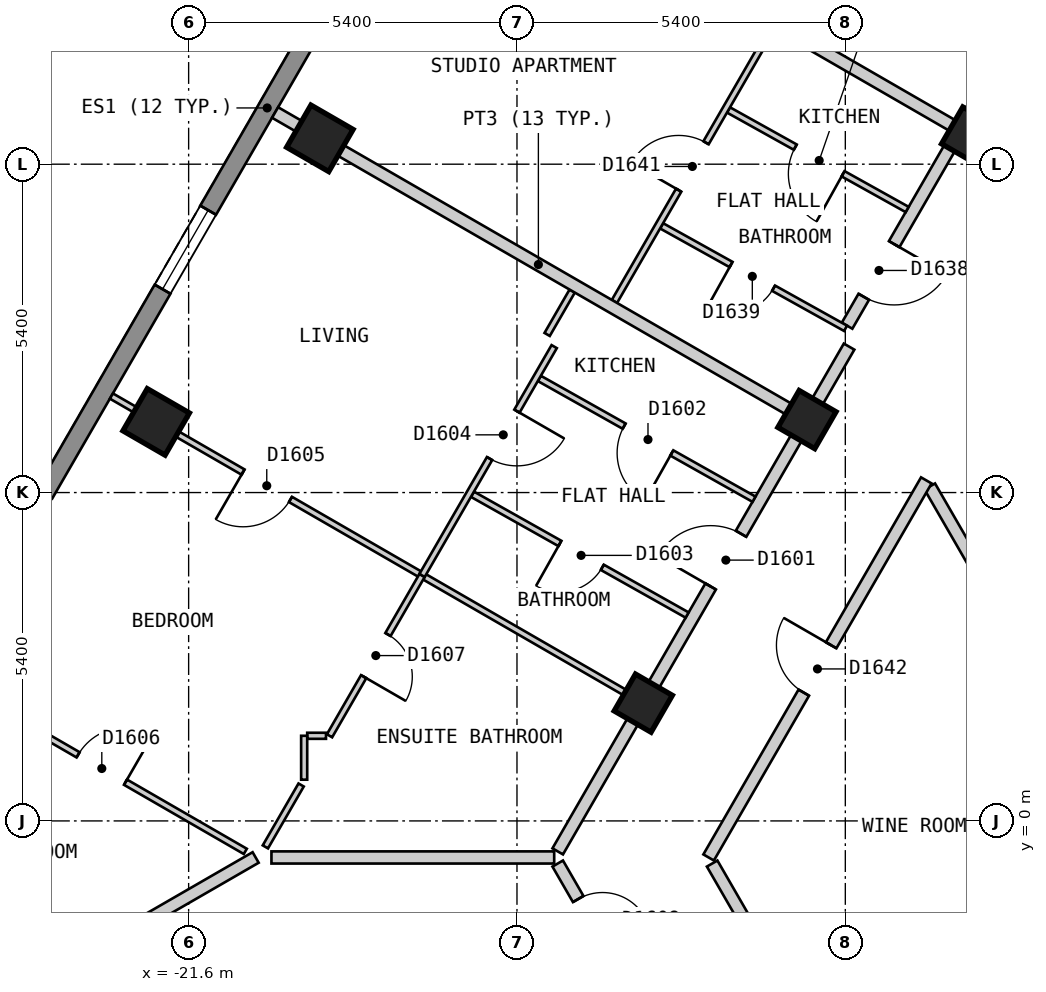
"""IFC4 building model, lengths in metres.
Left out: names, types, materials, properties, quantities, classifications, styles, units other than length and angle.
Written with IfcOpenShell. Run it as: python <this file> out.ifc"""

import sys

from ifc_helpers import new_model, si_unit, direction, frame, frame_2d, origin, origin_2d, place, context, subcontext, project, spatial, polyline, rectangle, outline, extrude, element, fill, save


model = new_model("IFC4")
c1 = context("Model", 3, precision=1e-05, world=origin(), true_north=direction((0.0, 1.0)))
c2 = subcontext(c1, "Body", "Model", "MODEL_VIEW")
j1 = project(units=[si_unit("LENGTHUNIT", "METRE"), si_unit("PLANEANGLEUNIT", "RADIAN")], contexts=[c1])
p1 = place(None, origin())
s1 = spatial("IfcSite", under=j1, at=p1, CompositionType="ELEMENT")
p2 = place(p1, origin())
s2 = spatial("IfcBuilding", under=s1, at=p2, CompositionType="ELEMENT")
p3 = place(p2, frame((0.0, 0.0, 163.2)))
s3 = spatial("IfcBuildingStorey", under=s2, at=p3, CompositionType="ELEMENT", Elevation=163.2)
for number, where, z_axis, x_axis in (
    (1, (-19.442, 11.225, 0.0), (0.0, 0.0, 1.0), (-0.5, -0.866, 0.0)),
    (2, (-22.134, 6.562, 0.0), (0.0, 0.0, 1.0), (-0.5, -0.866, 0.0)),
):
    element("IfcColumn", number, at=place(p3, frame(where, z_axis=z_axis, x_axis=x_axis)), inside=s3, PredefinedType="COLUMN", context=c2, shape_type="SweptSolid", body=[
        extrude(rectangle(XDim=0.8, YDim=0.8, at=origin_2d()), origin(), (0.0, 0.0, 1.0), 3.0),
    ])
for number, where, z_axis, x_axis in (
    (3, (-8.739, 11.263, 0.0), (0.0, 0.0, 1.0), (-0.5, -0.866, 0.0)),
    (4, (-11.431, 6.6, 0.0), (0.0, 0.0, 1.0), (-0.5, -0.866, 0.0)),
    (5, (-14.123, 1.937, 0.0), (0.0, 0.0, 1.0), (-0.5, -0.866, 0.0)),
):
    element("IfcColumn", number, at=place(p3, frame(where, z_axis=z_axis, x_axis=x_axis)), inside=s3, PredefinedType="COLUMN", context=c2, shape_type="SweptSolid", body=[
        extrude(rectangle(XDim=0.7, YDim=0.7, at=origin_2d()), origin(), (0.0, 0.0, 1.0), 3.0),
    ])
p4 = place(p3, frame((-14.592, 21.625, 0.0), z_axis=(0.0, 0.0, 1.0), x_axis=(-0.500010537973, -0.866019319597, 0.0)))
e6 = element("IfcWall", 6, at=p4, inside=s3, PredefinedType="SOLIDWALL", context=c2, shape_type="SweptSolid", body=[
    extrude(outline(polyline([(0.0, -0.15), (22.863, -0.15), (22.783, 0.15), (0.08, 0.15), (0.0, -0.15)])), origin(), (0.0, 0.0, 1.0), 2.7),
])
p5 = place(p4, frame((2.606, 0.0, 0.15)))
e7 = element("IfcOpeningElement", 7, at=p5, cuts=e6, PredefinedType="OPENING", context=c2, shape_type="SweptSolid", body=[
    extrude(rectangle(XDim=1.5, YDim=2.1, at=frame_2d((0.75, 1.05))), frame((0.0, 0.16, 0.0), z_axis=(0.0, -1.0, 0.0), x_axis=(1.0, 0.0, 0.0)), (0.0, 0.0, 1.0), 0.32),
])
p6 = place(p4, frame((7.99, 0.0, 0.15)))
e8 = element("IfcOpeningElement", 8, at=p6, cuts=e6, PredefinedType="OPENING", context=c2, shape_type="SweptSolid", body=[
    extrude(rectangle(XDim=1.5, YDim=2.1, at=frame_2d((0.75, 1.05))), frame((0.0, 0.16, 0.0), z_axis=(0.0, -1.0, 0.0), x_axis=(1.0, 0.0, 0.0)), (0.0, 0.0, 1.0), 0.32),
])
p7 = place(p4, frame((13.373, 0.0, 0.15)))
e9 = element("IfcOpeningElement", 9, at=p7, cuts=e6, PredefinedType="OPENING", context=c2, shape_type="SweptSolid", body=[
    extrude(rectangle(XDim=1.5, YDim=2.1, at=frame_2d((0.75, 1.05))), frame((0.0, 0.16, 0.0), z_axis=(0.0, -1.0, 0.0), x_axis=(1.0, 0.0, 0.0)), (0.0, 0.0, 1.0), 0.32),
])
p8 = place(p4, frame((18.758, 0.0, 0.15)))
e10 = element("IfcOpeningElement", 10, at=p8, cuts=e6, PredefinedType="OPENING", context=c2, shape_type="SweptSolid", body=[
    extrude(rectangle(XDim=1.5, YDim=2.1, at=frame_2d((0.75, 1.05))), frame((0.0, 0.16, 0.0), z_axis=(0.0, -1.0, 0.0), x_axis=(1.0, 0.0, 0.0)), (0.0, 0.0, 1.0), 0.32),
])
p9 = place(p3, frame((-9.411, 5.5, 0.0), z_axis=(0.0, 0.0, 1.0), x_axis=(0.500018099276, -0.86601495391, 0.0)))
e11 = element("IfcWall", 11, at=p9, inside=s3, PredefinedType="PARTITIONING", context=c2, shape_type="SweptSolid", body=[
    extrude(rectangle(XDim=4.765, YDim=0.2, at=frame_2d((2.383, 0.0))), origin(), (0.0, 0.0, 1.0), 2.7),
])
p10 = place(p3, frame((-12.99, -0.701, 0.0), z_axis=(0.0, 0.0, 1.0), x_axis=(0.499972710878, -0.866041158593, 0.0)))
e12 = element("IfcWall", 12, at=p10, inside=s3, PredefinedType="PARTITIONING", context=c2, shape_type="SweptSolid", body=[
    extrude(rectangle(XDim=2.308, YDim=0.2, at=frame_2d((1.154, 0.0))), origin(), (0.0, 0.0, 1.0), 2.7),
])
p11 = place(p3, frame((-15.53, -0.701, 0.0), z_axis=(0.0, 0.0, 1.0), x_axis=(0.499972710878, -0.866041158593, 0.0)))
e13 = element("IfcWall", 13, at=p11, inside=s3, PredefinedType="PARTITIONING", context=c2, shape_type="SweptSolid", body=[
    extrude(rectangle(XDim=2.308, YDim=0.2, at=frame_2d((1.154, 0.0))), origin(), (0.0, 0.0, 1.0), 2.7),
])
p12 = place(p11, frame((0.674, 0.0, 0.0)))
e14 = element("IfcOpeningElement", 14, at=p12, cuts=e13, PredefinedType="OPENING", context=c2, shape_type="SweptSolid", body=[
    extrude(rectangle(XDim=0.8, YDim=2.1, at=frame_2d((0.4, 1.05))), frame((0.0, 0.11, 0.0), z_axis=(0.0, -1.0, 0.0), x_axis=(1.0, 0.0, 0.0)), (0.0, 0.0, 1.0), 0.22),
])
p13 = place(p3, frame((-13.048, -0.601, 0.0), z_axis=(0.0, 0.0, 1.0), x_axis=(0.499982180423, 0.866035691677, 0.0)))
e15 = element("IfcWall", 15, at=p13, inside=s3, PredefinedType="PARTITIONING", context=c2, shape_type="SweptSolid", body=[
    extrude(rectangle(XDim=7.16, YDim=0.2, at=frame_2d((3.58, 0.0))), origin(), (0.0, 0.0, 1.0), 2.7),
])
p14 = place(p13, frame((3.13, 0.0, 0.0)))
e16 = element("IfcOpeningElement", 16, at=p14, cuts=e15, PredefinedType="OPENING", context=c2, shape_type="SweptSolid", body=[
    extrude(rectangle(XDim=0.9, YDim=2.1, at=frame_2d((0.45, 1.05))), frame((0.0, 0.11, 0.0), z_axis=(0.0, -1.0, 0.0), x_axis=(1.0, 0.0, 0.0)), (0.0, 0.0, 1.0), 0.22),
])
p15 = place(p3, frame((-15.53, -0.501, 0.0), z_axis=(0.0, 0.0, 1.0), x_axis=(0.499952498232, 0.866052827206, 0.0)))
e17 = element("IfcWall", 17, at=p15, inside=s3, PredefinedType="PARTITIONING", context=c2, shape_type="SweptSolid", body=[
    extrude(rectangle(XDim=9.585, YDim=0.2, at=frame_2d((4.792, 0.0))), origin(), (0.0, 0.0, 1.0), 2.7),
])
p16 = place(p15, frame((5.031, 0.0, 0.0)))
e18 = element("IfcOpeningElement", 18, at=p16, cuts=e17, PredefinedType="OPENING", context=c2, shape_type="SweptSolid", body=[
    extrude(rectangle(XDim=1.0, YDim=2.1, at=frame_2d((0.5, 1.05))), frame((0.0, 0.11, 0.0), z_axis=(0.0, -1.0, 0.0), x_axis=(1.0, 0.0, 0.0)), (0.0, 0.0, 1.0), 0.22),
])
p17 = place(p3, frame((-10.771, 8.144, 0.0), z_axis=(0.0, 0.0, 1.0), x_axis=(0.500008507724, 0.866020491792, 0.0)))
e19 = element("IfcWall", 19, at=p17, inside=s3, PredefinedType="PARTITIONING", context=c2, shape_type="SweptSolid", body=[
    extrude(rectangle(XDim=10.688, YDim=0.2, at=frame_2d((5.344, 0.0))), origin(), (0.0, 0.0, 1.0), 2.7),
])
p18 = place(p17, frame((9.692, 0.0, 0.0)))
e20 = element("IfcOpeningElement", 20, at=p18, cuts=e19, PredefinedType="OPENING", context=c2, shape_type="SweptSolid", body=[
    extrude(rectangle(XDim=0.8, YDim=2.1, at=frame_2d((0.4, 1.05))), frame((0.0, 0.11, 0.0), z_axis=(0.0, -1.0, 0.0), x_axis=(1.0, 0.0, 0.0)), (0.0, 0.0, 1.0), 0.22),
])
p19 = place(p17, frame((0.549, 0.0, 0.0)))
e21 = element("IfcOpeningElement", 21, at=p19, cuts=e19, PredefinedType="OPENING", context=c2, shape_type="SweptSolid", body=[
    extrude(rectangle(XDim=1.0, YDim=2.1, at=frame_2d((0.5, 1.05))), frame((0.0, 0.11, 0.0), z_axis=(0.0, -1.0, 0.0), x_axis=(1.0, 0.0, 0.0)), (0.0, 0.0, 1.0), 0.22),
])
p20 = place(p3, frame((-12.721, 11.692, 0.0), z_axis=(0.0, 0.0, 1.0), x_axis=(0.873557394398, -0.486721150859, 0.0)))
e22 = element("IfcWall", 22, at=p20, inside=s3, PredefinedType="PARTITIONING", context=c2, shape_type="SweptSolid", body=[
    extrude(rectangle(XDim=3.363, YDim=0.1, at=frame_2d((1.682, 0.0))), origin(), (0.0, 0.0, 1.0), 2.7),
])
p21 = place(p20, frame((1.257, 0.0, 0.0)))
e23 = element("IfcOpeningElement", 23, at=p21, cuts=e22, PredefinedType="OPENING", context=c2, shape_type="SweptSolid", body=[
    extrude(rectangle(XDim=0.9, YDim=2.1, at=frame_2d((0.45, 1.05))), frame((0.0, 0.06, 0.0), z_axis=(0.0, -1.0, 0.0), x_axis=(1.0, 0.0, 0.0)), (0.0, 0.0, 1.0), 0.12),
])
p22 = place(p3, frame((-13.821, 9.786, 0.0), z_axis=(0.0, 0.0, 1.0), x_axis=(0.873644620966, -0.486564565353, 0.0)))
e24 = element("IfcWall", 24, at=p22, inside=s3, PredefinedType="PARTITIONING", context=c2, shape_type="SweptSolid", body=[
    extrude(rectangle(XDim=3.463, YDim=0.1, at=frame_2d((1.731, 0.0))), origin(), (0.0, 0.0, 1.0), 2.7),
])
p23 = place(p22, frame((1.307, 0.0, 0.0)))
e25 = element("IfcOpeningElement", 25, at=p23, cuts=e24, PredefinedType="OPENING", context=c2, shape_type="SweptSolid", body=[
    extrude(rectangle(XDim=0.8, YDim=2.1, at=frame_2d((0.4, 1.05))), frame((0.0, 0.06, 0.0), z_axis=(0.0, -1.0, 0.0), x_axis=(1.0, 0.0, 0.0)), (0.0, 0.0, 1.0), 0.12),
])
p24 = place(p3, frame((-16.932, 5.372, 0.0), z_axis=(0.0, 0.0, 1.0), x_axis=(0.871514356952, -0.490369988505, 0.0)))
e26 = element("IfcWall", 26, at=p24, inside=s3, PredefinedType="PARTITIONING", context=c2, shape_type="SweptSolid", body=[
    extrude(rectangle(XDim=4.05, YDim=0.1, at=frame_2d((2.025, 0.0))), origin(), (0.0, 0.0, 1.0), 2.7),
])
p25 = place(p24, frame((1.65, 0.0, 0.0)))
e27 = element("IfcOpeningElement", 27, at=p25, cuts=e26, PredefinedType="OPENING", context=c2, shape_type="SweptSolid", body=[
    extrude(rectangle(XDim=0.8, YDim=2.1, at=frame_2d((0.4, 1.05))), frame((0.0, 0.06, 0.0), z_axis=(0.0, -1.0, 0.0), x_axis=(1.0, 0.0, 0.0)), (0.0, 0.0, 1.0), 0.12),
])
p26 = place(p3, frame((-15.832, 7.277, 0.0), z_axis=(0.0, 0.0, 1.0), x_axis=(0.871528850672, -0.490344228523, 0.0)))
e28 = element("IfcWall", 28, at=p26, inside=s3, PredefinedType="PARTITIONING", context=c2, shape_type="SweptSolid", body=[
    extrude(rectangle(XDim=4.05, YDim=0.1, at=frame_2d((2.025, 0.0))), origin(), (0.0, 0.0, 1.0), 2.7),
])
p27 = place(p26, frame((1.6, 0.0, 0.0)))
e29 = element("IfcOpeningElement", 29, at=p27, cuts=e28, PredefinedType="OPENING", context=c2, shape_type="SweptSolid", body=[
    extrude(rectangle(XDim=0.9, YDim=2.1, at=frame_2d((0.45, 1.05))), frame((0.0, 0.06, 0.0), z_axis=(0.0, -1.0, 0.0), x_axis=(1.0, 0.0, 0.0)), (0.0, 0.0, 1.0), 0.12),
])
p28 = place(p3, frame((-22.87, 6.987, 0.0), z_axis=(0.0, 0.0, 1.0), x_axis=(0.866022959057, -0.500004234368, 0.0)))
e30 = element("IfcWall", 30, at=p28, inside=s3, PredefinedType="PARTITIONING", context=c2, shape_type="SweptSolid", body=[
    extrude(rectangle(XDim=10.0, YDim=0.1, at=frame_2d((5.0, 0.0))), origin(), (0.0, 0.0, 1.0), 2.7),
])
p29 = place(p28, frame((2.5, 0.0, 0.0)))
e31 = element("IfcOpeningElement", 31, at=p29, cuts=e30, PredefinedType="OPENING", context=c2, shape_type="SweptSolid", body=[
    extrude(rectangle(XDim=0.9, YDim=2.1, at=frame_2d((0.45, 1.05))), frame((0.0, 0.06, 0.0), z_axis=(0.0, -1.0, 0.0), x_axis=(1.0, 0.0, 0.0)), (0.0, 0.0, 1.0), 0.12),
])
p30 = place(p3, frame((-25.562, 2.325, 0.0), z_axis=(0.0, 0.0, 1.0), x_axis=(0.865998530728, -0.500046542611, 0.0)))
e32 = element("IfcWall", 32, at=p30, inside=s3, PredefinedType="PARTITIONING", context=c2, shape_type="SweptSolid", body=[
    extrude(rectangle(XDim=5.651, YDim=0.1, at=frame_2d((2.826, 0.0))), origin(), (0.0, 0.0, 1.0), 2.7),
])
p31 = place(p30, frame((2.476, 0.0, 0.0)))
e33 = element("IfcOpeningElement", 33, at=p31, cuts=e32, PredefinedType="OPENING", context=c2, shape_type="SweptSolid", body=[
    extrude(rectangle(XDim=0.9, YDim=2.1, at=frame_2d((0.45, 1.05))), frame((0.0, 0.06, 0.0), z_axis=(0.0, -1.0, 0.0), x_axis=(1.0, 0.0, 0.0)), (0.0, 0.0, 1.0), 0.12),
])
p32 = place(p3, frame((-19.65, 1.4, 0.0), z_axis=(0.0, 0.0, 1.0), x_axis=(1.0, 0.0, 0.0)))
e34 = element("IfcWall", 34, at=p32, inside=s3, PredefinedType="PARTITIONING", context=c2, shape_type="SweptSolid", body=[
    extrude(rectangle(XDim=0.309, YDim=0.1, at=frame_2d((0.154, 0.0))), origin(), (0.0, 0.0, 1.0), 2.7),
])
p33 = place(p3, frame((-14.597, 8.543, 0.0), z_axis=(0.0, 0.0, 1.0), x_axis=(0.499962957901, 0.866046788994, 0.0)))
e35 = element("IfcWall", 35, at=p33, inside=s3, PredefinedType="PARTITIONING", context=c2, shape_type="SweptSolid", body=[
    extrude(rectangle(XDim=5.185, YDim=0.1, at=frame_2d((2.592, 0.0))), origin(), (0.0, 0.0, 1.0), 2.7),
])
p34 = place(p33, frame((2.113, 0.0, 0.0)))
e36 = element("IfcOpeningElement", 36, at=p34, cuts=e35, PredefinedType="OPENING", context=c2, shape_type="SweptSolid", body=[
    extrude(rectangle(XDim=0.9, YDim=2.1, at=frame_2d((0.45, 1.05))), frame((0.0, 0.06, 0.0), z_axis=(0.0, -1.0, 0.0), x_axis=(1.0, 0.0, 0.0)), (0.0, 0.0, 1.0), 0.12),
])
p35 = place(p3, frame((-20.338, -0.427, 0.0), z_axis=(0.0, 0.0, 1.0), x_axis=(0.500069990121, 0.865984991198, 0.0)))
e37 = element("IfcWall", 37, at=p35, inside=s3, PredefinedType="PARTITIONING", context=c2, shape_type="SweptSolid", body=[
    extrude(rectangle(XDim=1.176, YDim=0.1, at=frame_2d((0.588, 0.0))), origin(), (0.0, 0.0, 1.0), 2.7),
])
p36 = place(p3, frame((-19.283, 1.4, 0.0), z_axis=(0.0, 0.0, 1.0), x_axis=(0.499847391584, 0.866113494368, 0.0)))
e38 = element("IfcWall", 38, at=p36, inside=s3, PredefinedType="PARTITIONING", context=c2, shape_type="SweptSolid", body=[
    extrude(rectangle(XDim=3.045, YDim=0.1, at=frame_2d((1.522, 0.0))), origin(), (0.0, 0.0, 1.0), 2.7),
])
p37 = place(p36, frame((1.123, 0.0, 0.0)))
e39 = element("IfcOpeningElement", 39, at=p37, cuts=e38, PredefinedType="OPENING", context=c2, shape_type="SweptSolid", body=[
    extrude(rectangle(XDim=0.8, YDim=2.1, at=frame_2d((0.4, 1.05))), frame((0.0, 0.06, 0.0), z_axis=(0.0, -1.0, 0.0), x_axis=(1.0, 0.0, 0.0)), (0.0, 0.0, 1.0), 0.12),
])
p38 = place(p3, frame((-15.704, 8.0, 0.0), z_axis=(0.0, 0.0, 1.0), x_axis=(0.499833531678, 0.866121492985, 0.0)))
e40 = element("IfcWall", 40, at=p38, inside=s3, PredefinedType="PARTITIONING", context=c2, shape_type="SweptSolid", body=[
    extrude(rectangle(XDim=0.824, YDim=0.1, at=frame_2d((0.412, 0.0))), origin(), (0.0, 0.0, 1.0), 2.7),
])
p39 = place(p3, frame((-19.7, 0.678, 0.0), z_axis=(0.0, 0.0, 1.0), x_axis=(0.0, 1.0, 0.0)))
e41 = element("IfcWall", 41, at=p39, inside=s3, PredefinedType="PARTITIONING", context=c2, shape_type="SweptSolid", body=[
    extrude(rectangle(XDim=0.722, YDim=0.1, at=frame_2d((0.361, 0.0))), origin(), (0.0, 0.0, 1.0), 2.7),
])
p40 = place(p3, frame((-20.178, 11.65, 0.0), z_axis=(0.0, 0.0, 1.0), x_axis=(0.866016855193, -0.500014806302, 0.0)))
e42 = element("IfcWall", 42, at=p40, inside=s3, PredefinedType="PARTITIONING", context=c2, shape_type="SweptSolid", body=[
    extrude(rectangle(XDim=10.0, YDim=0.2, at=frame_2d((5.0, 0.0))), origin(), (0.0, 0.0, 1.0), 2.7),
])
p41 = place(p3, frame((-11.856, 13.063, 0.0), z_axis=(0.0, 0.0, 1.0), x_axis=(0.865966208357, -0.500102515474, 0.0)))
e43 = element("IfcWall", 43, at=p41, inside=s3, PredefinedType="PARTITIONING", context=c2, shape_type="SweptSolid", body=[
    extrude(rectangle(XDim=3.299, YDim=0.2, at=frame_2d((1.649, 0.0))), origin(), (0.0, 0.0, 1.0), 2.7),
])
p42 = place(p3, frame((-20.238, -0.601, 0.0), z_axis=(0.0, 0.0, 1.0), x_axis=(1.0, 0.0, 0.0)))
e44 = element("IfcWall", 44, at=p42, inside=s3, PredefinedType="PARTITIONING", context=c2, shape_type="SweptSolid", body=[
    extrude(rectangle(XDim=4.65, YDim=0.2, at=frame_2d((2.325, 0.0))), origin(), (0.0, 0.0, 1.0), 2.7),
])
p43 = place(p3, frame((-25.563, -3.524, 0.0), z_axis=(0.0, 0.0, 1.0), x_axis=(0.866128586522, 0.499821239653, 0.0)))
e45 = element("IfcWall", 45, at=p43, inside=s3, PredefinedType="PARTITIONING", context=c2, shape_type="SweptSolid", body=[
    extrude(rectangle(XDim=5.848, YDim=0.2, at=frame_2d((2.924, 0.0))), origin(), (0.0, 0.0, 1.0), 2.7),
])
p44 = place(p3, frame((-17.761, 4.037, 0.0), z_axis=(0.0, 0.0, 1.0), x_axis=(0.50009692756, 0.865969435399, 0.0)))
e46 = element("IfcWall", 46, at=p44, inside=s3, PredefinedType="PARTITIONING", context=c2, shape_type="SweptSolid", body=[
    extrude(rectangle(XDim=4.345, YDim=0.1, at=frame_2d((2.173, 0.0))), origin(), (0.0, 0.0, 1.0), 2.7),
])
p45 = place(p44, frame((2.22, 0.0, 0.0)))
e47 = element("IfcOpeningElement", 47, at=p45, cuts=e46, PredefinedType="OPENING", context=c2, shape_type="SweptSolid", body=[
    extrude(rectangle(XDim=0.9, YDim=2.1, at=frame_2d((0.45, 1.05))), frame((0.0, 0.06, 0.0), z_axis=(0.0, -1.0, 0.0), x_axis=(1.0, 0.0, 0.0)), (0.0, 0.0, 1.0), 0.12),
])
p46 = place(p7, origin())
e48 = element("IfcWindow", 48, at=p46, inside=s3, PartitioningType="SINGLE_PANEL", PredefinedType="WINDOW", context=c2, shape_type="SweptSolid", body=[
    extrude(rectangle(XDim=1.5, YDim=2.1, at=frame_2d((0.75, 1.05))), frame((0.0, 0.03, 0.0), z_axis=(0.0, -1.0, 0.0), x_axis=(1.0, 0.0, 0.0)), (0.0, 0.0, 1.0), 0.06),
])
fill(e9, e48)
p47 = place(p16, origin())
e49 = element("IfcDoor", 49, at=p47, inside=s3, OperationType="SINGLE_SWING_LEFT", PredefinedType="DOOR", context=c2, shape_type="SweptSolid", body=[
    extrude(rectangle(XDim=1.0, YDim=2.1, at=frame_2d((0.5, 1.05))), frame((0.0, 0.025, 0.0), z_axis=(0.0, -1.0, 0.0), x_axis=(1.0, 0.0, 0.0)), (0.0, 0.0, 1.0), 0.05),
])
fill(e18, e49)
p48 = place(p27, origin())
e50 = element("IfcDoor", 50, at=p48, inside=s3, OperationType="SINGLE_SWING_RIGHT", PredefinedType="DOOR", context=c2, shape_type="SweptSolid", body=[
    extrude(rectangle(XDim=0.9, YDim=2.1, at=frame_2d((0.45, 1.05))), frame((0.0, 0.025, 0.0), z_axis=(0.0, -1.0, 0.0), x_axis=(1.0, 0.0, 0.0)), (0.0, 0.0, 1.0), 0.05),
])
fill(e29, e50)
p49 = place(p25, origin())
e51 = element("IfcDoor", 51, at=p49, inside=s3, OperationType="SINGLE_SWING_LEFT", PredefinedType="DOOR", context=c2, shape_type="SweptSolid", body=[
    extrude(rectangle(XDim=0.8, YDim=2.1, at=frame_2d((0.4, 1.05))), frame((0.0, 0.025, 0.0), z_axis=(0.0, -1.0, 0.0), x_axis=(1.0, 0.0, 0.0)), (0.0, 0.0, 1.0), 0.05),
])
fill(e27, e51)
p50 = place(p45, origin())
e52 = element("IfcDoor", 52, at=p50, inside=s3, OperationType="SINGLE_SWING_RIGHT", PredefinedType="DOOR", context=c2, shape_type="SweptSolid", body=[
    extrude(rectangle(XDim=0.9, YDim=2.1, at=frame_2d((0.45, 1.05))), frame((0.0, 0.025, 0.0), z_axis=(0.0, -1.0, 0.0), x_axis=(1.0, 0.0, 0.0)), (0.0, 0.0, 1.0), 0.05),
])
fill(e47, e52)
p51 = place(p29, origin())
e53 = element("IfcDoor", 53, at=p51, inside=s3, OperationType="SINGLE_SWING_LEFT", PredefinedType="DOOR", context=c2, shape_type="SweptSolid", body=[
    extrude(rectangle(XDim=0.9, YDim=2.1, at=frame_2d((0.45, 1.05))), frame((0.0, 0.025, 0.0), z_axis=(0.0, -1.0, 0.0), x_axis=(1.0, 0.0, 0.0)), (0.0, 0.0, 1.0), 0.05),
])
fill(e31, e53)
p52 = place(p31, origin())
e54 = element("IfcDoor", 54, at=p52, inside=s3, OperationType="SINGLE_SWING_RIGHT", PredefinedType="DOOR", context=c2, shape_type="SweptSolid", body=[
    extrude(rectangle(XDim=0.9, YDim=2.1, at=frame_2d((0.45, 1.05))), frame((0.0, 0.025, 0.0), z_axis=(0.0, -1.0, 0.0), x_axis=(1.0, 0.0, 0.0)), (0.0, 0.0, 1.0), 0.05),
])
fill(e33, e54)
p53 = place(p37, origin())
e55 = element("IfcDoor", 55, at=p53, inside=s3, OperationType="SINGLE_SWING_LEFT", PredefinedType="DOOR", context=c2, shape_type="SweptSolid", body=[
    extrude(rectangle(XDim=0.8, YDim=2.1, at=frame_2d((0.4, 1.05))), frame((0.0, 0.025, 0.0), z_axis=(0.0, -1.0, 0.0), x_axis=(1.0, 0.0, 0.0)), (0.0, 0.0, 1.0), 0.05),
])
fill(e39, e55)
p54 = place(p12, origin())
e56 = element("IfcDoor", 56, at=p54, inside=s3, OperationType="SINGLE_SWING_RIGHT", PredefinedType="DOOR", context=c2, shape_type="SweptSolid", body=[
    extrude(rectangle(XDim=0.8, YDim=2.1, at=frame_2d((0.4, 1.05))), frame((0.0, 0.025, 0.0), z_axis=(0.0, -1.0, 0.0), x_axis=(1.0, 0.0, 0.0)), (0.0, 0.0, 1.0), 0.05),
])
fill(e14, e56)
p55 = place(p19, origin())
e57 = element("IfcDoor", 57, at=p55, inside=s3, OperationType="SINGLE_SWING_RIGHT", PredefinedType="DOOR", context=c2, shape_type="SweptSolid", body=[
    extrude(rectangle(XDim=1.0, YDim=2.1, at=frame_2d((0.5, 1.05))), frame((0.0, 0.025, 0.0), z_axis=(0.0, -1.0, 0.0), x_axis=(1.0, 0.0, 0.0)), (0.0, 0.0, 1.0), 0.05),
])
fill(e21, e57)
p56 = place(p23, origin())
e58 = element("IfcDoor", 58, at=p56, inside=s3, OperationType="SINGLE_SWING_LEFT", PredefinedType="DOOR", context=c2, shape_type="SweptSolid", body=[
    extrude(rectangle(XDim=0.8, YDim=2.1, at=frame_2d((0.4, 1.05))), frame((0.0, 0.025, 0.0), z_axis=(0.0, -1.0, 0.0), x_axis=(1.0, 0.0, 0.0)), (0.0, 0.0, 1.0), 0.05),
])
fill(e25, e58)
p57 = place(p21, origin())
e59 = element("IfcDoor", 59, at=p57, inside=s3, OperationType="SINGLE_SWING_RIGHT", PredefinedType="DOOR", context=c2, shape_type="SweptSolid", body=[
    extrude(rectangle(XDim=0.9, YDim=2.1, at=frame_2d((0.45, 1.05))), frame((0.0, 0.025, 0.0), z_axis=(0.0, -1.0, 0.0), x_axis=(1.0, 0.0, 0.0)), (0.0, 0.0, 1.0), 0.05),
])
fill(e23, e59)
p58 = place(p34, origin())
e60 = element("IfcDoor", 60, at=p58, inside=s3, OperationType="SINGLE_SWING_LEFT", PredefinedType="DOOR", context=c2, shape_type="SweptSolid", body=[
    extrude(rectangle(XDim=0.9, YDim=2.1, at=frame_2d((0.45, 1.05))), frame((0.0, 0.025, 0.0), z_axis=(0.0, -1.0, 0.0), x_axis=(1.0, 0.0, 0.0)), (0.0, 0.0, 1.0), 0.05),
])
fill(e36, e60)
p59 = place(p14, origin())
e61 = element("IfcDoor", 61, at=p59, inside=s3, OperationType="SINGLE_SWING_RIGHT", PredefinedType="DOOR", context=c2, shape_type="SweptSolid", body=[
    extrude(rectangle(XDim=0.9, YDim=2.1, at=frame_2d((0.45, 1.05))), frame((0.0, 0.025, 0.0), z_axis=(0.0, -1.0, 0.0), x_axis=(1.0, 0.0, 0.0)), (0.0, 0.0, 1.0), 0.05),
])
fill(e16, e61)
save(model, sys.argv[1])
